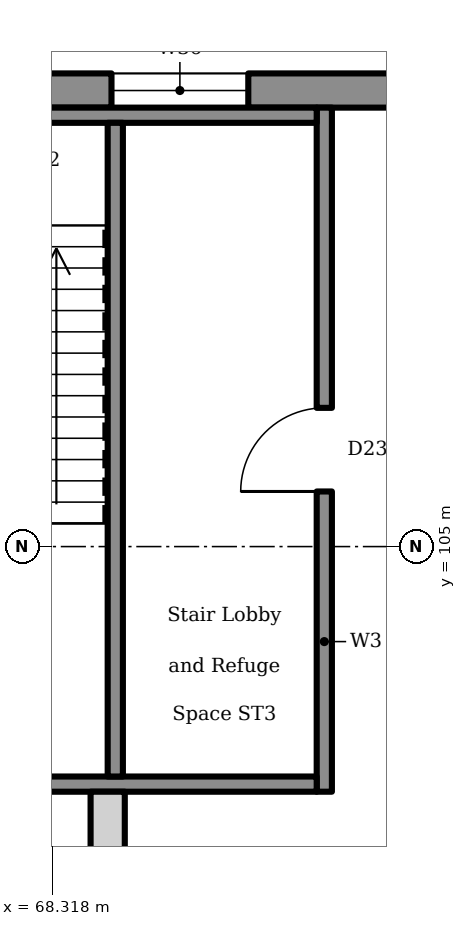
"""IFC4 building model, lengths in metres.
Left out: names, types, materials, properties, quantities, classifications, styles, units other than length and angle.
Written with IfcOpenShell. Run it as: python <this file> out.ifc"""

import sys

from ifc_helpers import new_model, si_unit, direction, frame, frame_2d, origin, place, context, subcontext, project, spatial, rectangle, extrude, element, fill, save


model = new_model("IFC4")
c1 = context("Model", 3, precision=1e-05, world=origin(), true_north=direction((0.0, 1.0)))
c2 = subcontext(c1, "Body", "Model", "MODEL_VIEW")
j1 = project(units=[si_unit("LENGTHUNIT", "METRE"), si_unit("PLANEANGLEUNIT", "RADIAN")], contexts=[c1])
p1 = place(None, origin())
s1 = spatial("IfcSite", under=j1, at=p1, CompositionType="ELEMENT")
p2 = place(p1, origin())
s2 = spatial("IfcBuilding", under=s1, at=p2, CompositionType="ELEMENT")
p3 = place(p2, origin())
s3 = spatial("IfcBuildingStorey", under=s2, at=p3, CompositionType="ELEMENT", Elevation=0.0)
p4 = place(p3, frame((65.5, 111.0, 0.0), z_axis=(0.0, 0.0, 1.0), x_axis=(1.0, 0.0, 0.0)))
e1 = element("IfcWall", 1, at=p4, inside=s3, PredefinedType="SOLIDWALL", context=c2, shape_type="SweptSolid", body=[
    extrude(rectangle(XDim=45.0, YDim=0.45, at=frame_2d((22.5, 0.0))), origin(), (0.0, 0.0, 1.0), 5.2),
])
p5 = place(p4, frame((12.6, 0.0, 0.0)))
e2 = element("IfcOpeningElement", 2, at=p5, cuts=e1, PredefinedType="OPENING", context=c2, shape_type="SweptSolid", body=[
    extrude(rectangle(XDim=1.8, YDim=3.0, at=frame_2d((0.9, 1.5))), frame((0.0, 0.235, 0.0), z_axis=(0.0, -1.0, 0.0), x_axis=(1.0, 0.0, 0.0)), (0.0, 0.0, 1.0), 0.47),
])
p6 = place(p4, frame((19.65, 0.0, 0.0)))
e3 = element("IfcOpeningElement", 3, at=p6, cuts=e1, PredefinedType="OPENING", context=c2, shape_type="SweptSolid", body=[
    extrude(rectangle(XDim=1.8, YDim=3.0, at=frame_2d((0.9, 1.5))), frame((0.0, 0.235, 0.0), z_axis=(0.0, -1.0, 0.0), x_axis=(1.0, 0.0, 0.0)), (0.0, 0.0, 1.0), 0.47),
])
p7 = place(p4, frame((21.6, 0.0, 0.0)))
e4 = element("IfcOpeningElement", 4, at=p7, cuts=e1, PredefinedType="OPENING", context=c2, shape_type="SweptSolid", body=[
    extrude(rectangle(XDim=1.8, YDim=3.0, at=frame_2d((0.9, 1.5))), frame((0.0, 0.235, 0.0), z_axis=(0.0, -1.0, 0.0), x_axis=(1.0, 0.0, 0.0)), (0.0, 0.0, 1.0), 0.47),
])
p8 = place(p4, frame((23.55, 0.0, 0.0)))
e5 = element("IfcOpeningElement", 5, at=p8, cuts=e1, PredefinedType="OPENING", context=c2, shape_type="SweptSolid", body=[
    extrude(rectangle(XDim=1.8, YDim=3.0, at=frame_2d((0.9, 1.5))), frame((0.0, 0.235, 0.0), z_axis=(0.0, -1.0, 0.0), x_axis=(1.0, 0.0, 0.0)), (0.0, 0.0, 1.0), 0.47),
])
p9 = place(p4, frame((30.6, 0.0, 0.0)))
e6 = element("IfcOpeningElement", 6, at=p9, cuts=e1, PredefinedType="OPENING", context=c2, shape_type="SweptSolid", body=[
    extrude(rectangle(XDim=1.8, YDim=3.0, at=frame_2d((0.9, 1.5))), frame((0.0, 0.235, 0.0), z_axis=(0.0, -1.0, 0.0), x_axis=(1.0, 0.0, 0.0)), (0.0, 0.0, 1.0), 0.47),
])
p10 = place(p4, frame((3.6, 0.0, 0.9)))
e7 = element("IfcOpeningElement", 7, at=p10, cuts=e1, PredefinedType="OPENING", context=c2, shape_type="SweptSolid", body=[
    extrude(rectangle(XDim=1.8, YDim=2.8, at=frame_2d((0.9, 1.4))), frame((0.0, 0.235, 0.0), z_axis=(0.0, -1.0, 0.0), x_axis=(1.0, 0.0, 0.0)), (0.0, 0.0, 1.0), 0.47),
])
p11 = place(p4, frame((8.1, 0.0, 0.9)))
e8 = element("IfcOpeningElement", 8, at=p11, cuts=e1, PredefinedType="OPENING", context=c2, shape_type="SweptSolid", body=[
    extrude(rectangle(XDim=1.8, YDim=2.8, at=frame_2d((0.9, 1.4))), frame((0.0, 0.235, 0.0), z_axis=(0.0, -1.0, 0.0), x_axis=(1.0, 0.0, 0.0)), (0.0, 0.0, 1.0), 0.47),
])
p12 = place(p4, frame((17.1, 0.0, 0.9)))
e9 = element("IfcOpeningElement", 9, at=p12, cuts=e1, PredefinedType="OPENING", context=c2, shape_type="SweptSolid", body=[
    extrude(rectangle(XDim=1.8, YDim=2.8, at=frame_2d((0.9, 1.4))), frame((0.0, 0.235, 0.0), z_axis=(0.0, -1.0, 0.0), x_axis=(1.0, 0.0, 0.0)), (0.0, 0.0, 1.0), 0.47),
])
p13 = place(p4, frame((26.1, 0.0, 0.9)))
e10 = element("IfcOpeningElement", 10, at=p13, cuts=e1, PredefinedType="OPENING", context=c2, shape_type="SweptSolid", body=[
    extrude(rectangle(XDim=1.8, YDim=2.8, at=frame_2d((0.9, 1.4))), frame((0.0, 0.235, 0.0), z_axis=(0.0, -1.0, 0.0), x_axis=(1.0, 0.0, 0.0)), (0.0, 0.0, 1.0), 0.47),
])
p14 = place(p4, frame((35.1, 0.0, 0.9)))
e11 = element("IfcOpeningElement", 11, at=p14, cuts=e1, PredefinedType="OPENING", context=c2, shape_type="SweptSolid", body=[
    extrude(rectangle(XDim=1.8, YDim=2.8, at=frame_2d((0.9, 1.4))), frame((0.0, 0.235, 0.0), z_axis=(0.0, -1.0, 0.0), x_axis=(1.0, 0.0, 0.0)), (0.0, 0.0, 1.0), 0.47),
])
p15 = place(p4, frame((39.6, 0.0, 0.9)))
e12 = element("IfcOpeningElement", 12, at=p15, cuts=e1, PredefinedType="OPENING", context=c2, shape_type="SweptSolid", body=[
    extrude(rectangle(XDim=1.8, YDim=2.8, at=frame_2d((0.9, 1.4))), frame((0.0, 0.235, 0.0), z_axis=(0.0, -1.0, 0.0), x_axis=(1.0, 0.0, 0.0)), (0.0, 0.0, 1.0), 0.47),
])
p16 = place(p3, frame((69.05, 96.0, 0.0), z_axis=(0.0, 0.0, 1.0), x_axis=(0.0, 1.0, 0.0)))
e13 = element("IfcWall", 13, at=p16, inside=s3, PredefinedType="SOLIDWALL", context=c2, shape_type="SweptSolid", body=[
    extrude(rectangle(XDim=5.775, YDim=0.45, at=frame_2d((2.887, 0.0))), origin(), (0.0, 0.0, 1.0), 5.2),
])
p17 = place(p16, frame((1.988, 0.0, 0.9)))
e14 = element("IfcOpeningElement", 14, at=p17, cuts=e13, PredefinedType="OPENING", context=c2, shape_type="SweptSolid", body=[
    extrude(rectangle(XDim=1.8, YDim=2.8, at=frame_2d((0.9, 1.4))), frame((0.0, 0.235, 0.0), z_axis=(0.0, -1.0, 0.0), x_axis=(1.0, 0.0, 0.0)), (0.0, 0.0, 1.0), 0.47),
])
p18 = place(p3, frame((71.9, 101.775, 0.0), z_axis=(0.0, 0.0, 1.0), x_axis=(0.0, 1.0, 0.0)))
e15 = element("IfcWall", 15, at=p18, inside=s3, PredefinedType="SOLIDWALL", context=c2, shape_type="SweptSolid", body=[
    extrude(rectangle(XDim=9.0, YDim=0.2, at=frame_2d((4.5, 0.0))), origin(), (0.0, 0.0, 1.0), 5.2),
])
p19 = place(p18, frame((3.95, 0.0, 0.0)))
e16 = element("IfcOpeningElement", 16, at=p19, cuts=e15, PredefinedType="OPENING", context=c2, shape_type="SweptSolid", body=[
    extrude(rectangle(XDim=1.1, YDim=2.1, at=frame_2d((0.55, 1.05))), frame((0.0, 0.11, 0.0), z_axis=(0.0, -1.0, 0.0), x_axis=(1.0, 0.0, 0.0)), (0.0, 0.0, 1.0), 0.22),
])
for number, where, z_axis, x_axis in (
    (17, (66.2, 101.875, 0.0), (0.0, 0.0, 1.0), (1.0, 0.0, 0.0)),
    (18, (66.2, 110.675, 0.0), (0.0, 0.0, 1.0), (1.0, 0.0, 0.0)),
):
    element("IfcWall", number, at=place(p3, frame(where, z_axis=z_axis, x_axis=x_axis)), inside=s3, PredefinedType="SOLIDWALL", context=c2, shape_type="SweptSolid", body=[
        extrude(rectangle(XDim=5.6, YDim=0.2, at=frame_2d((2.8, 0.0))), origin(), (0.0, 0.0, 1.0), 5.2),
    ])
p20 = place(p3, frame((69.15, 101.975, 0.0), z_axis=(0.0, 0.0, 1.0), x_axis=(0.0, 1.0, 0.0)))
e19 = element("IfcWall", 19, at=p20, inside=s3, PredefinedType="SOLIDWALL", context=c2, shape_type="SweptSolid", body=[
    extrude(rectangle(XDim=8.6, YDim=0.2, at=frame_2d((4.3, 0.0))), origin(), (0.0, 0.0, 1.0), 5.2),
])
p21 = place(p10, origin())
e20 = element("IfcWindow", 20, at=p21, inside=s3, PartitioningType="SINGLE_PANEL", PredefinedType="WINDOW", context=c2, shape_type="SweptSolid", body=[
    extrude(rectangle(XDim=1.8, YDim=2.8, at=frame_2d((0.9, 1.4))), frame((0.0, 0.03, 0.0), z_axis=(0.0, -1.0, 0.0), x_axis=(1.0, 0.0, 0.0)), (0.0, 0.0, 1.0), 0.06),
])
fill(e7, e20)
p22 = place(p19, origin())
e21 = element("IfcDoor", 21, at=p22, inside=s3, OperationType="SINGLE_SWING_RIGHT", PredefinedType="DOOR", context=c2, shape_type="SweptSolid", body=[
    extrude(rectangle(XDim=1.1, YDim=2.1, at=frame_2d((0.55, 1.05))), frame((0.0, 0.025, 0.0), z_axis=(0.0, -1.0, 0.0), x_axis=(1.0, 0.0, 0.0)), (0.0, 0.0, 1.0), 0.05),
])
fill(e16, e21)
save(model, sys.argv[1])
